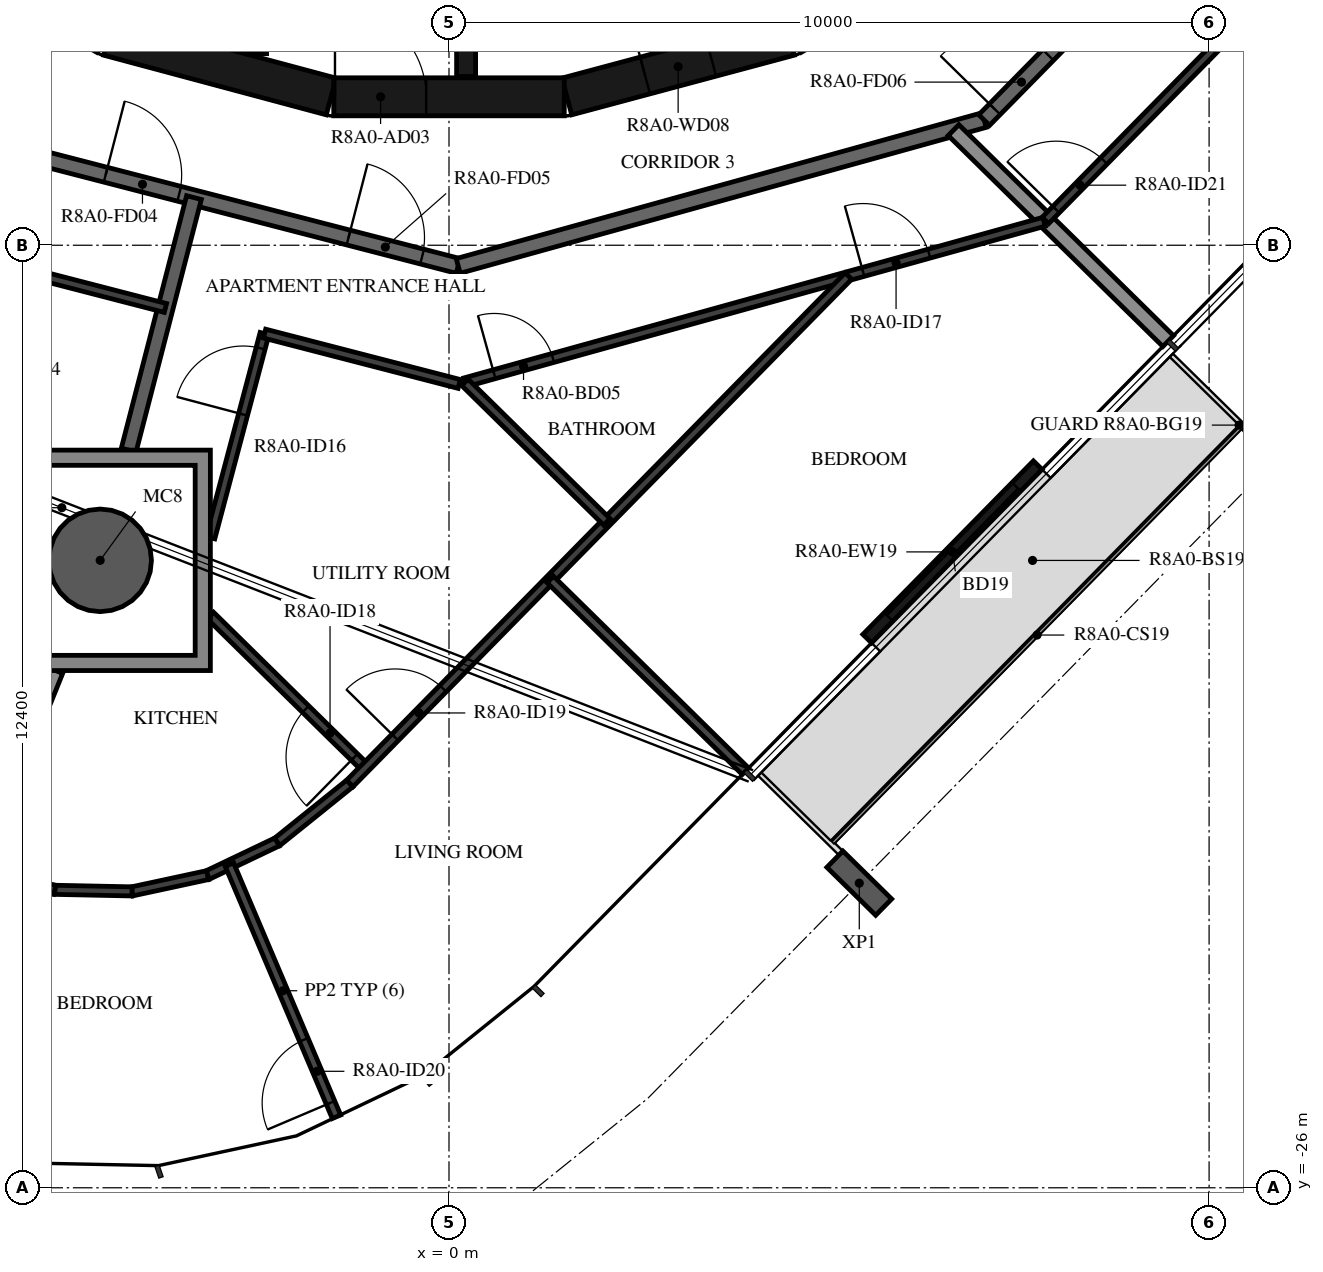
"""IFC4 building model, lengths in metres.
Left out: names, types, materials, properties, quantities, classifications, styles, units other than length and angle.
Written with IfcOpenShell. Run it as: python <this file> out.ifc"""

import sys

from ifc_helpers import new_model, si_unit, direction, frame, frame_2d, origin, origin_2d, place, context, subcontext, project, spatial, polyline, rectangle, hollow_circle, i_section, outline, extrude, element, fill, save


model = new_model("IFC4")
c1 = context("Model", 3, precision=1e-05, world=origin(), true_north=direction((0.0, 1.0)))
c2 = subcontext(c1, "Body", "Model", "MODEL_VIEW")
j1 = project(units=[si_unit("LENGTHUNIT", "METRE"), si_unit("PLANEANGLEUNIT", "RADIAN")], contexts=[c1])
p1 = place(None, origin())
s1 = spatial("IfcSite", under=j1, at=p1, CompositionType="ELEMENT")
p2 = place(p1, origin())
s2 = spatial("IfcBuilding", under=s1, at=p2, CompositionType="ELEMENT")
p3 = place(p2, frame((0.0, 0.0, 305.2)))
s3 = spatial("IfcBuildingStorey", under=s2, at=p3, CompositionType="ELEMENT", Elevation=305.2)
p4 = place(p3, frame((-4.589, -17.745, -0.38), z_axis=(0.0, 0.0, 1.0), x_axis=(1.0, 0.0, 0.0)))
e1 = element("IfcColumn", 1, at=p4, inside=s3, PredefinedType="COLUMN", context=c2, shape_type="SweptSolid", body=[
    extrude(hollow_circle(Radius=0.675, WallThickness=0.03, at=origin_2d()), origin(), (0.0, 0.0, 1.0), 3.5),
])
p5 = place(p3, frame((5.398, -21.992, -0.38), z_axis=(0.0, 0.0, 1.0), x_axis=(-0.70090935439, -0.713250360623, 0.0)))
e2 = element("IfcColumn", 2, at=p5, inside=s3, PredefinedType="COLUMN", context=c2, shape_type="SweptSolid", body=[
    extrude(i_section(OverallWidth=0.3, OverallDepth=0.9, WebThickness=0.019, FlangeThickness=0.035, FilletRadius=0.03, at=origin_2d()), origin(), (0.0, 0.0, 1.0), 3.5),
])
p6 = place(p3, frame((5.502, -18.776, 0.0), z_axis=(0.0, 0.0, 1.0), x_axis=(0.700900076932, 0.713259477439, 0.0)))
e3 = element("IfcWall", 3, at=p6, inside=s3, PredefinedType="STANDARD", context=c2, shape_type="SweptSolid", body=[
    extrude(rectangle(XDim=3.2, YDim=0.16, at=frame_2d((1.6, 0.0))), origin(), (0.0, 0.0, 1.0), 3.12),
])
p7 = place(p6, frame((0.4, 0.0, 0.0)))
e4 = element("IfcOpeningElement", 4, at=p7, cuts=e3, PredefinedType="OPENING", context=c2, shape_type="SweptSolid", body=[
    extrude(rectangle(XDim=2.4, YDim=2.4, at=frame_2d((1.2, 1.2))), frame((0.0, 0.09, 0.0), z_axis=(0.0, -1.0, 0.0), x_axis=(1.0, 0.0, 0.0)), (0.0, 0.0, 1.0), 0.18),
])
p8 = place(p3, frame((1.55, -11.643, 0.0), z_axis=(0.0, 0.0, 1.0), x_axis=(0.965948410781, 0.258734743916, 0.0)))
e5 = element("IfcWall", 5, at=p8, inside=s3, PredefinedType="SHEAR", context=c2, shape_type="SweptSolid", body=[
    extrude(rectangle(XDim=3.033, YDim=0.5, at=frame_2d((1.516, 0.0))), origin(), (0.0, 0.0, 1.0), 3.12),
])
p9 = place(p8, frame((1.066, 0.0, 0.0)))
e6 = element("IfcOpeningElement", 6, at=p9, cuts=e5, PredefinedType="OPENING", context=c2, shape_type="SweptSolid", body=[
    extrude(rectangle(XDim=0.9, YDim=2.1, at=frame_2d((0.45, 1.05))), frame((0.0, 0.26, 0.0), z_axis=(0.0, -1.0, 0.0), x_axis=(1.0, 0.0, 0.0)), (0.0, 0.0, 1.0), 0.52),
])
p10 = place(p3, frame((-4.479, -10.858, 0.0), z_axis=(0.0, 0.0, 1.0), x_axis=(0.965948410781, -0.258734743916, 0.0)))
e7 = element("IfcWall", 7, at=p10, inside=s3, PredefinedType="SHEAR", context=c2, shape_type="SweptSolid", body=[
    extrude(rectangle(XDim=3.033, YDim=0.5, at=frame_2d((1.516, 0.0))), origin(), (0.0, 0.0, 1.0), 3.12),
])
p11 = place(p3, frame((-1.516, -11.647, 0.0), z_axis=(0.0, 0.0, 1.0), x_axis=(1.0, 0.0, 0.0)))
e8 = element("IfcWall", 8, at=p11, inside=s3, PredefinedType="SHEAR", context=c2, shape_type="SweptSolid", body=[
    extrude(rectangle(XDim=3.033, YDim=0.5, at=frame_2d((1.516, 0.0))), origin(), (0.0, 0.0, 1.0), 3.12),
])
p12 = place(p11, frame((0.016, 0.0, 0.0)))
e9 = element("IfcOpeningElement", 9, at=p12, cuts=e8, PredefinedType="OPENING", context=c2, shape_type="SweptSolid", body=[
    extrude(rectangle(XDim=1.2, YDim=2.1, at=frame_2d((0.6, 1.05))), frame((0.0, 0.26, 0.0), z_axis=(0.0, -1.0, 0.0), x_axis=(1.0, 0.0, 0.0)), (0.0, 0.0, 1.0), 0.52),
])
p13 = place(p3, frame((-2.525, -8.97, 0.0), z_axis=(0.0, 0.0, 1.0), x_axis=(0.0, -1.0, 0.0)))
e10 = element("IfcWall", 10, at=p13, inside=s3, PredefinedType="SHEAR", context=c2, shape_type="SweptSolid", body=[
    extrude(rectangle(XDim=2.11, YDim=0.25, at=frame_2d((1.055, 0.0))), origin(), (0.0, 0.0, 1.0), 3.12),
])
p14 = place(p3, frame((0.225, -8.97, 0.0), z_axis=(0.0, 0.0, 1.0), x_axis=(0.0, -1.0, 0.0)))
e11 = element("IfcWall", 11, at=p14, inside=s3, PredefinedType="SHEAR", context=c2, shape_type="SweptSolid", body=[
    extrude(rectangle(XDim=2.41, YDim=0.25, at=frame_2d((1.205, 0.0))), origin(), (0.0, 0.0, 1.0), 3.12),
])
p15 = place(p3, frame((-6.831, -12.074, 0.0), z_axis=(0.0, 0.0, 1.0), x_axis=(0.968144780225, -0.250391063186, 0.0)))
e12 = element("IfcWall", 12, at=p15, inside=s3, PredefinedType="STANDARD", context=c2, shape_type="SweptSolid", body=[
    extrude(rectangle(XDim=7.181, YDim=0.2, at=frame_2d((3.591, 0.0))), origin(), (0.0, 0.0, 1.0), 3.12),
])
p16 = place(p15, frame((2.39, 0.0, 0.0)))
e13 = element("IfcOpeningElement", 13, at=p16, cuts=e12, PredefinedType="OPENING", context=c2, shape_type="SweptSolid", body=[
    extrude(rectangle(XDim=1.0, YDim=2.1, at=frame_2d((0.5, 1.05))), frame((0.0, 0.11, 0.0), z_axis=(0.0, -1.0, 0.0), x_axis=(1.0, 0.0, 0.0)), (0.0, 0.0, 1.0), 0.22),
])
p17 = place(p15, frame((5.69, 0.0, 0.0)))
e14 = element("IfcOpeningElement", 14, at=p17, cuts=e12, PredefinedType="OPENING", context=c2, shape_type="SweptSolid", body=[
    extrude(rectangle(XDim=1.0, YDim=2.1, at=frame_2d((0.5, 1.05))), frame((0.0, 0.11, 0.0), z_axis=(0.0, -1.0, 0.0), x_axis=(1.0, 0.0, 0.0)), (0.0, 0.0, 1.0), 0.22),
])
p18 = place(p3, frame((0.121, -13.872, 0.0), z_axis=(0.0, 0.0, 1.0), x_axis=(0.963625960674, 0.267254575108, 0.0)))
e15 = element("IfcWall", 15, at=p18, inside=s3, PredefinedType="STANDARD", context=c2, shape_type="SweptSolid", body=[
    extrude(rectangle(XDim=7.181, YDim=0.2, at=frame_2d((3.591, 0.0))), origin(), (0.0, 0.0, 1.0), 3.12),
])
p19 = place(p3, frame((7.041, -11.953, 0.0), z_axis=(0.0, 0.0, 1.0), x_axis=(0.70090916255, 0.713250549143, 0.0)))
e16 = element("IfcWall", 16, at=p19, inside=s3, PredefinedType="STANDARD", context=c2, shape_type="SweptSolid", body=[
    extrude(rectangle(XDim=7.181, YDim=0.2, at=frame_2d((3.59, 0.0))), origin(), (0.0, 0.0, 1.0), 3.12),
])
p20 = place(p19, frame((0.2, 0.0, 0.0)))
e17 = element("IfcOpeningElement", 17, at=p20, cuts=e16, PredefinedType="OPENING", context=c2, shape_type="SweptSolid", body=[
    extrude(rectangle(XDim=1.0, YDim=2.1, at=frame_2d((0.5, 1.05))), frame((0.0, 0.11, 0.0), z_axis=(0.0, -1.0, 0.0), x_axis=(1.0, 0.0, 0.0)), (0.0, 0.0, 1.0), 0.22),
])
p21 = place(p3, frame((-4.214, -16.295, 0.0), z_axis=(0.0, 0.0, 1.0), x_axis=(0.250428810918, 0.968135016752, 0.0)))
e18 = element("IfcWall", 18, at=p21, inside=s3, PredefinedType="STANDARD", context=c2, shape_type="SweptSolid", body=[
    extrude(rectangle(XDim=3.432, YDim=0.2, at=frame_2d((1.716, 0.0))), origin(), (0.0, 0.0, 1.0), 3.12),
])
p22 = place(p3, frame((-7.582, -25.151, 0.0), z_axis=(0.0, 0.0, 1.0), x_axis=(0.374645287615, 0.927168220156, 0.0)))
e19 = element("IfcWall", 19, at=p22, inside=s3, PredefinedType="STANDARD", context=c2, shape_type="SweptSolid", body=[
    extrude(rectangle(XDim=6.423, YDim=0.2, at=frame_2d((3.212, 0.0))), origin(), (0.0, 0.0, 1.0), 2.73),
])
p23 = place(p3, frame((9.462, -14.861, 0.0), z_axis=(0.0, 0.0, 1.0), x_axis=(-0.713276937124, 0.700882308927, 0.0)))
e20 = element("IfcWall", 20, at=p23, inside=s3, PredefinedType="STANDARD", context=c2, shape_type="SweptSolid", body=[
    extrude(rectangle(XDim=3.959, YDim=0.2, at=frame_2d((1.979, 0.0))), origin(), (0.0, 0.0, 1.0), 2.73),
])
p24 = place(p3, frame((-7.596, -13.426, 0.0), z_axis=(0.0, 0.0, 1.0), x_axis=(0.96815406745, -0.250355151095, 0.0)))
e21 = element("IfcWall", 21, at=p24, inside=s3, PredefinedType="PARTITIONING", context=c2, shape_type="SweptSolid", body=[
    extrude(rectangle(XDim=3.992, YDim=0.12, at=frame_2d((1.996, 0.0))), origin(), (0.0, 0.0, 1.0), 3.12),
])
p25 = place(p24, frame((0.2, 0.0, 0.0)))
e22 = element("IfcOpeningElement", 22, at=p25, cuts=e21, PredefinedType="OPENING", context=c2, shape_type="SweptSolid", body=[
    extrude(rectangle(XDim=0.9, YDim=2.1, at=frame_2d((0.45, 1.05))), frame((0.0, 0.07, 0.0), z_axis=(0.0, -1.0, 0.0), x_axis=(1.0, 0.0, 0.0)), (0.0, 0.0, 1.0), 0.14),
])
p26 = place(p3, frame((-3.139, -17.448, 0.0), z_axis=(0.0, 0.0, 1.0), x_axis=(0.256551998295, 0.966530430028, 0.0)))
e23 = element("IfcWall", 23, at=p26, inside=s3, PredefinedType="PARTITIONING", context=c2, shape_type="SweptSolid", body=[
    extrude(rectangle(XDim=2.778, YDim=0.12, at=frame_2d((1.389, 0.0))), origin(), (0.0, 0.0, 1.0), 3.12),
])
p27 = place(p26, frame((1.678, 0.0, 0.0)))
e24 = element("IfcOpeningElement", 24, at=p27, cuts=e23, PredefinedType="OPENING", context=c2, shape_type="SweptSolid", body=[
    extrude(rectangle(XDim=0.9, YDim=2.1, at=frame_2d((0.45, 1.05))), frame((0.0, 0.07, 0.0), z_axis=(0.0, -1.0, 0.0), x_axis=(1.0, 0.0, 0.0)), (0.0, 0.0, 1.0), 0.14),
])
p28 = place(p3, frame((-2.427, -14.763, 0.0), z_axis=(0.0, 0.0, 1.0), x_axis=(0.968151154118, -0.250366417036, 0.0)))
e25 = element("IfcWall", 25, at=p28, inside=s3, PredefinedType="PARTITIONING", context=c2, shape_type="SweptSolid", body=[
    extrude(rectangle(XDim=2.646, YDim=0.12, at=frame_2d((1.323, 0.0))), origin(), (0.0, 0.0, 1.0), 3.12),
])
p29 = place(p3, frame((0.21, -15.404, 0.0), z_axis=(0.0, 0.0, 1.0), x_axis=(0.963630625717, 0.267237754032, 0.0)))
e26 = element("IfcWall", 26, at=p29, inside=s3, PredefinedType="PARTITIONING", context=c2, shape_type="SweptSolid", body=[
    extrude(rectangle(XDim=7.907, YDim=0.12, at=frame_2d((3.954, 0.0))), origin(), (0.0, 0.0, 1.0), 3.12),
])
p30 = place(p29, frame((0.4, 0.0, 0.0)))
e27 = element("IfcOpeningElement", 27, at=p30, cuts=e26, PredefinedType="OPENING", context=c2, shape_type="SweptSolid", body=[
    extrude(rectangle(XDim=0.8, YDim=2.1, at=frame_2d((0.4, 1.05))), frame((0.0, 0.07, 0.0), z_axis=(0.0, -1.0, 0.0), x_axis=(1.0, 0.0, 0.0)), (0.0, 0.0, 1.0), 0.14),
])
p31 = place(p29, frame((5.436, 0.0, 0.0)))
e28 = element("IfcOpeningElement", 28, at=p31, cuts=e26, PredefinedType="OPENING", context=c2, shape_type="SweptSolid", body=[
    extrude(rectangle(XDim=0.9, YDim=2.1, at=frame_2d((0.45, 1.05))), frame((0.0, 0.07, 0.0), z_axis=(0.0, -1.0, 0.0), x_axis=(1.0, 0.0, 0.0)), (0.0, 0.0, 1.0), 0.14),
])
p32 = place(p3, frame((-2.26, -21.449, 0.0), z_axis=(0.0, 0.0, 1.0), x_axis=(-0.90254047062, -0.430605038166, 0.0)))
e29 = element("IfcWall", 29, at=p32, inside=s3, PredefinedType="PARTITIONING", context=c2, shape_type="SweptSolid", body=[
    extrude(rectangle(XDim=1.016, YDim=0.12, at=frame_2d((0.508, 0.0))), origin(), (0.0, 0.0, 1.0), 3.12),
])
for number, where, z_axis, x_axis in (
    (30, (-3.177, -21.887, 0.0), (0.0, 0.0, 1.0), (-0.978, -0.211, 0.0)),
    (31, (-4.17, -22.101, 0.0), (0.0, 0.0, 1.0), (-1.0, 0.02, 0.0)),
):
    element("IfcWall", number, at=place(p3, frame(where, z_axis=z_axis, x_axis=x_axis)), inside=s3, PredefinedType="PARTITIONING", context=c2, shape_type="SweptSolid", body=[
        extrude(rectangle(XDim=1.016, YDim=0.12, at=frame_2d((0.508, 0.0))), origin(), (0.0, 0.0, 1.0), 3.12),
    ])
p33 = place(p3, frame((-5.186, -22.08, 0.0), z_axis=(0.0, 0.0, 1.0), x_axis=(-0.968145907309, 0.250386705241, 0.0)))
e32 = element("IfcWall", 32, at=p33, inside=s3, PredefinedType="PARTITIONING", context=c2, shape_type="SweptSolid", body=[
    extrude(rectangle(XDim=1.016, YDim=0.12, at=frame_2d((0.508, 0.0))), origin(), (0.0, 0.0, 1.0), 3.12),
])
p34 = place(p3, frame((-1.48, -25.066, 0.0), z_axis=(0.0, 0.0, 1.0), x_axis=(-0.3909326022, 0.920419306912, 0.0)))
e33 = element("IfcWall", 33, at=p34, inside=s3, PredefinedType="PARTITIONING", context=c2, shape_type="SweptSolid", body=[
    extrude(rectangle(XDim=3.604, YDim=0.12, at=frame_2d((1.802, 0.0))), origin(), (0.0, 0.0, 1.0), 2.73),
])
p35 = place(p34, frame((0.2, 0.0, 0.0)))
e34 = element("IfcOpeningElement", 34, at=p35, cuts=e33, PredefinedType="OPENING", context=c2, shape_type="SweptSolid", body=[
    extrude(rectangle(XDim=0.9, YDim=2.1, at=frame_2d((0.45, 1.05))), frame((0.0, 0.07, 0.0), z_axis=(0.0, -1.0, 0.0), x_axis=(1.0, 0.0, 0.0)), (0.0, 0.0, 1.0), 0.14),
])
p36 = place(p3, frame((-1.101, -20.474, 0.0), z_axis=(0.0, 0.0, 1.0), x_axis=(-0.713316946232, 0.700841589961, 0.0)))
e35 = element("IfcWall", 35, at=p36, inside=s3, PredefinedType="PARTITIONING", context=c2, shape_type="SweptSolid", body=[
    extrude(rectangle(XDim=2.857, YDim=0.12, at=frame_2d((1.429, 0.0))), origin(), (0.0, 0.0, 1.0), 3.12),
])
p37 = place(p36, frame((0.2, 0.0, 0.0)))
e36 = element("IfcOpeningElement", 36, at=p37, cuts=e35, PredefinedType="OPENING", context=c2, shape_type="SweptSolid", body=[
    extrude(rectangle(XDim=0.9, YDim=2.1, at=frame_2d((0.45, 1.05))), frame((0.0, 0.07, 0.0), z_axis=(0.0, -1.0, 0.0), x_axis=(1.0, 0.0, 0.0)), (0.0, 0.0, 1.0), 0.14),
])
p38 = place(p3, frame((-2.26, -21.449, 0.0), z_axis=(0.0, 0.0, 1.0), x_axis=(0.779021167429, 0.626997624156, 0.0)))
e37 = element("IfcWall", 37, at=p38, inside=s3, PredefinedType="PARTITIONING", context=c2, shape_type="SweptSolid", body=[
    extrude(rectangle(XDim=1.227, YDim=0.12, at=frame_2d((0.614, 0.0))), origin(), (0.0, 0.0, 1.0), 3.12),
])
p39 = place(p3, frame((-1.304, -20.68, 0.0), z_axis=(0.0, 0.0, 1.0), x_axis=(0.700896976526, 0.713262524108, 0.0)))
e38 = element("IfcWall", 38, at=p39, inside=s3, PredefinedType="PARTITIONING", context=c2, shape_type="SweptSolid", body=[
    extrude(rectangle(XDim=9.358, YDim=0.12, at=frame_2d((4.679, 0.0))), origin(), (0.0, 0.0, 1.0), 3.12),
])
p40 = place(p39, frame((0.849, 0.0, 0.0)))
e39 = element("IfcOpeningElement", 39, at=p40, cuts=e38, PredefinedType="OPENING", context=c2, shape_type="SweptSolid", body=[
    extrude(rectangle(XDim=0.9, YDim=2.1, at=frame_2d((0.45, 1.05))), frame((0.0, 0.07, 0.0), z_axis=(0.0, -1.0, 0.0), x_axis=(1.0, 0.0, 0.0)), (0.0, 0.0, 1.0), 0.14),
])
p41 = place(p3, frame((2.077, -17.239, 0.0), z_axis=(0.0, 0.0, 1.0), x_axis=(-0.713235001716, 0.700924983381, 0.0)))
e40 = element("IfcWall", 40, at=p41, inside=s3, PredefinedType="PARTITIONING", context=c2, shape_type="SweptSolid", body=[
    extrude(rectangle(XDim=2.618, YDim=0.12, at=frame_2d((1.309, 0.0))), origin(), (0.0, 0.0, 1.0), 3.12),
])
p42 = place(p3, frame((3.9, -20.521, 0.0), z_axis=(0.0, 0.0, 1.0), x_axis=(-0.713217465002, 0.700942827637, 0.0)))
e41 = element("IfcWall", 41, at=p42, inside=s3, PredefinedType="PARTITIONING", context=c2, shape_type="SweptSolid", body=[
    extrude(rectangle(XDim=3.6, YDim=0.12, at=frame_2d((1.8, 0.0))), origin(), (0.0, 0.0, 1.0), 2.73),
])
p43 = place(p3, frame((7.846, -13.273, 0.0), z_axis=(0.0, 0.0, 1.0), x_axis=(0.700911018066, 0.713248725728, 0.0)))
e42 = element("IfcWall", 42, at=p43, inside=s3, PredefinedType="PARTITIONING", context=c2, shape_type="SweptSolid", body=[
    extrude(rectangle(XDim=7.935, YDim=0.12, at=frame_2d((3.968, 0.0))), origin(), (0.0, 0.0, 1.0), 3.12),
])
p44 = place(p43, frame((0.2, 0.0, 0.0)))
e43 = element("IfcOpeningElement", 43, at=p44, cuts=e42, PredefinedType="OPENING", context=c2, shape_type="SweptSolid", body=[
    extrude(rectangle(XDim=0.9, YDim=2.1, at=frame_2d((0.45, 1.05))), frame((0.0, 0.07, 0.0), z_axis=(0.0, -1.0, 0.0), x_axis=(1.0, 0.0, 0.0)), (0.0, 0.0, 1.0), 0.14),
])
p45 = place(p3, origin())
e44 = element("IfcWall", 44, at=p45, inside=s3, PredefinedType="STANDARD", context=c2, shape_type="SweptSolid", body=[
    extrude(outline(polyline([(-3.139, -16.295), (-3.139, -19.195), (-6.039, -19.195), (-6.039, -16.295), (-3.139, -16.295)]), holes=[polyline([(-5.839, -18.995), (-3.339, -18.995), (-3.339, -16.495), (-5.839, -16.495), (-5.839, -18.995)])]), origin(), (0.0, 0.0, 1.0), 3.12),
])
p46 = place(p7, origin())
e45 = element("IfcDoor", 45, at=p46, inside=s3, OperationType="DOUBLE_DOOR_SLIDING", PredefinedType="DOOR", context=c2, shape_type="SweptSolid", body=[
    extrude(rectangle(XDim=2.4, YDim=2.4, at=frame_2d((1.2, 1.2))), frame((0.0, 0.025, 0.0), z_axis=(0.0, -1.0, 0.0), x_axis=(1.0, 0.0, 0.0)), (0.0, 0.0, 1.0), 0.05),
])
fill(e4, e45)
p47 = place(p12, origin())
e46 = element("IfcDoor", 46, at=p47, inside=s3, OperationType="SINGLE_SWING_RIGHT", PredefinedType="DOOR", context=c2, shape_type="SweptSolid", body=[
    extrude(rectangle(XDim=1.2, YDim=2.1, at=frame_2d((0.6, 1.05))), frame((0.0, 0.025, 0.0), z_axis=(0.0, -1.0, 0.0), x_axis=(1.0, 0.0, 0.0)), (0.0, 0.0, 1.0), 0.05),
])
fill(e9, e46)
p48 = place(p9, origin())
e47 = element("IfcDoor", 47, at=p48, inside=s3, OperationType="SINGLE_SWING_RIGHT", PredefinedType="DOOR", context=c2, shape_type="SweptSolid", body=[
    extrude(rectangle(XDim=0.9, YDim=2.1, at=frame_2d((0.45, 1.05))), frame((0.0, 0.025, 0.0), z_axis=(0.0, -1.0, 0.0), x_axis=(1.0, 0.0, 0.0)), (0.0, 0.0, 1.0), 0.05),
])
fill(e6, e47)
p49 = place(p16, origin())
e48 = element("IfcDoor", 48, at=p49, inside=s3, OperationType="SINGLE_SWING_RIGHT", PredefinedType="DOOR", context=c2, shape_type="SweptSolid", body=[
    extrude(rectangle(XDim=1.0, YDim=2.1, at=frame_2d((0.5, 1.05))), frame((0.0, 0.025, 0.0), z_axis=(0.0, -1.0, 0.0), x_axis=(1.0, 0.0, 0.0)), (0.0, 0.0, 1.0), 0.05),
])
fill(e13, e48)
p50 = place(p17, origin())
e49 = element("IfcDoor", 49, at=p50, inside=s3, OperationType="SINGLE_SWING_LEFT", PredefinedType="DOOR", context=c2, shape_type="SweptSolid", body=[
    extrude(rectangle(XDim=1.0, YDim=2.1, at=frame_2d((0.5, 1.05))), frame((0.0, 0.025, 0.0), z_axis=(0.0, -1.0, 0.0), x_axis=(1.0, 0.0, 0.0)), (0.0, 0.0, 1.0), 0.05),
])
fill(e14, e49)
p51 = place(p27, origin())
e50 = element("IfcDoor", 50, at=p51, inside=s3, OperationType="SINGLE_SWING_LEFT", PredefinedType="DOOR", context=c2, shape_type="SweptSolid", body=[
    extrude(rectangle(XDim=0.9, YDim=2.1, at=frame_2d((0.45, 1.05))), frame((0.0, 0.025, 0.0), z_axis=(0.0, -1.0, 0.0), x_axis=(1.0, 0.0, 0.0)), (0.0, 0.0, 1.0), 0.05),
])
fill(e24, e50)
p52 = place(p30, origin())
e51 = element("IfcDoor", 51, at=p52, inside=s3, OperationType="SINGLE_SWING_LEFT", PredefinedType="DOOR", context=c2, shape_type="SweptSolid", body=[
    extrude(rectangle(XDim=0.8, YDim=2.1, at=frame_2d((0.4, 1.05))), frame((0.0, 0.025, 0.0), z_axis=(0.0, -1.0, 0.0), x_axis=(1.0, 0.0, 0.0)), (0.0, 0.0, 1.0), 0.05),
])
fill(e27, e51)
p53 = place(p31, origin())
e52 = element("IfcDoor", 52, at=p53, inside=s3, OperationType="SINGLE_SWING_LEFT", PredefinedType="DOOR", context=c2, shape_type="SweptSolid", body=[
    extrude(rectangle(XDim=0.9, YDim=2.1, at=frame_2d((0.45, 1.05))), frame((0.0, 0.025, 0.0), z_axis=(0.0, -1.0, 0.0), x_axis=(1.0, 0.0, 0.0)), (0.0, 0.0, 1.0), 0.05),
])
fill(e28, e52)
p54 = place(p37, origin())
e53 = element("IfcDoor", 53, at=p54, inside=s3, OperationType="SINGLE_SWING_LEFT", PredefinedType="DOOR", context=c2, shape_type="SweptSolid", body=[
    extrude(rectangle(XDim=0.9, YDim=2.1, at=frame_2d((0.45, 1.05))), frame((0.0, 0.025, 0.0), z_axis=(0.0, -1.0, 0.0), x_axis=(1.0, 0.0, 0.0)), (0.0, 0.0, 1.0), 0.05),
])
fill(e36, e53)
p55 = place(p40, origin())
e54 = element("IfcDoor", 54, at=p55, inside=s3, OperationType="SINGLE_SWING_LEFT", PredefinedType="DOOR", context=c2, shape_type="SweptSolid", body=[
    extrude(rectangle(XDim=0.9, YDim=2.1, at=frame_2d((0.45, 1.05))), frame((0.0, 0.025, 0.0), z_axis=(0.0, -1.0, 0.0), x_axis=(1.0, 0.0, 0.0)), (0.0, 0.0, 1.0), 0.05),
])
fill(e39, e54)
p56 = place(p35, origin())
e55 = element("IfcDoor", 55, at=p56, inside=s3, OperationType="SINGLE_SWING_LEFT", PredefinedType="DOOR", context=c2, shape_type="SweptSolid", body=[
    extrude(rectangle(XDim=0.9, YDim=2.1, at=frame_2d((0.45, 1.05))), frame((0.0, 0.025, 0.0), z_axis=(0.0, -1.0, 0.0), x_axis=(1.0, 0.0, 0.0)), (0.0, 0.0, 1.0), 0.05),
])
fill(e34, e55)
p57 = place(p20, origin())
e56 = element("IfcDoor", 56, at=p57, inside=s3, OperationType="SINGLE_SWING_LEFT", PredefinedType="DOOR", context=c2, shape_type="SweptSolid", body=[
    extrude(rectangle(XDim=1.0, YDim=2.1, at=frame_2d((0.5, 1.05))), frame((0.0, 0.025, 0.0), z_axis=(0.0, -1.0, 0.0), x_axis=(1.0, 0.0, 0.0)), (0.0, 0.0, 1.0), 0.05),
])
fill(e17, e56)
p58 = place(p44, origin())
e57 = element("IfcDoor", 57, at=p58, inside=s3, OperationType="SINGLE_SWING_LEFT", PredefinedType="DOOR", context=c2, shape_type="SweptSolid", body=[
    extrude(rectangle(XDim=0.9, YDim=2.1, at=frame_2d((0.45, 1.05))), frame((0.0, 0.025, 0.0), z_axis=(0.0, -1.0, 0.0), x_axis=(1.0, 0.0, 0.0)), (0.0, 0.0, 1.0), 0.05),
])
fill(e43, e57)
save(model, sys.argv[1])
